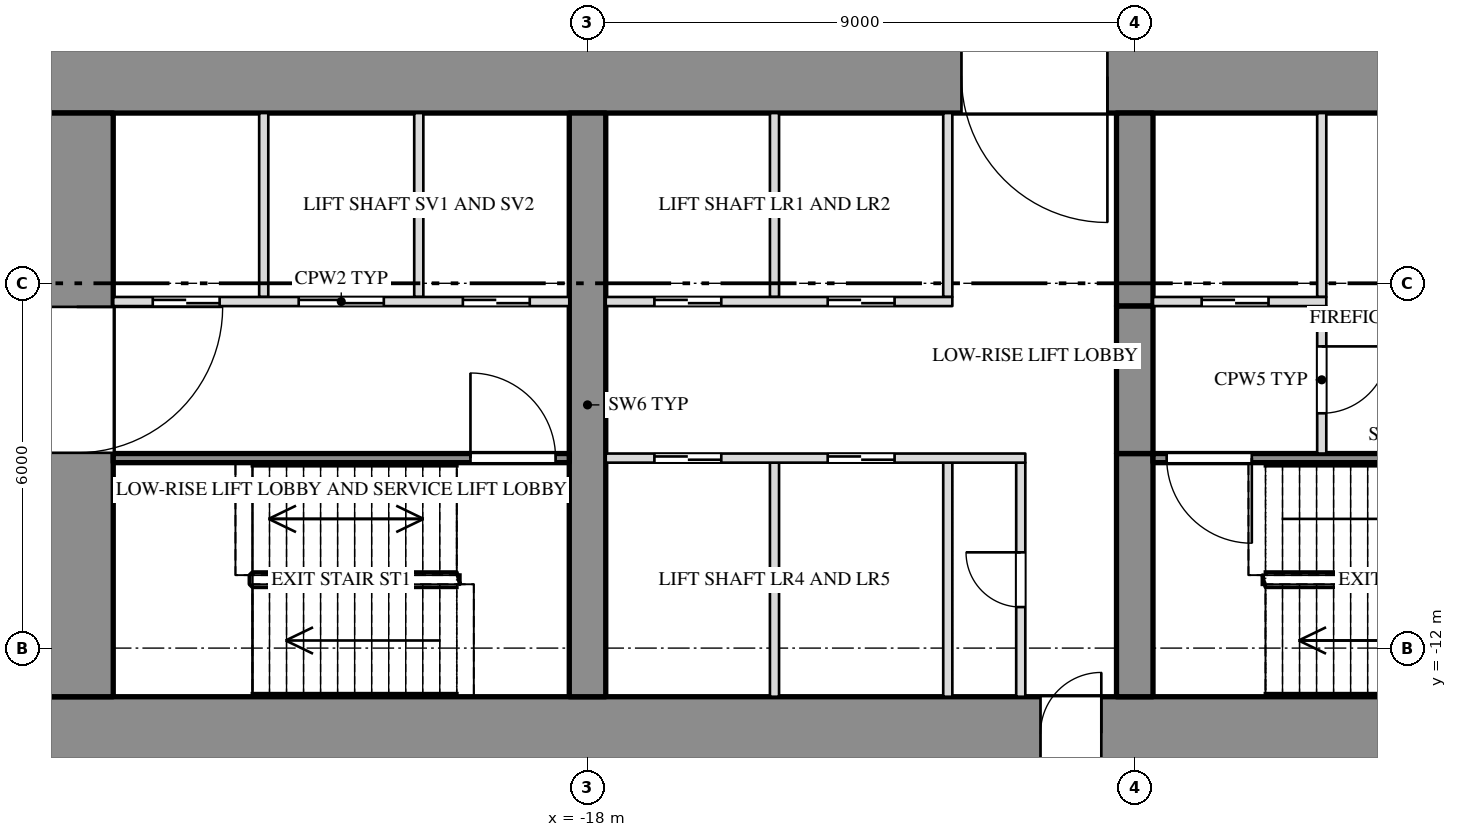
"""IFC4 building model, lengths in metres.
Left out: names, types, materials, properties, quantities, classifications, styles, units other than length and angle.
Written with IfcOpenShell. Run it as: python <this file> out.ifc"""

import sys

from ifc_helpers import new_model, si_unit, direction, frame, frame_2d, origin, place, context, subcontext, project, spatial, rectangle, extrude, element, fill, save


model = new_model("IFC4")
c1 = context("Model", 3, precision=1e-05, world=origin(), true_north=direction((0.0, 1.0)))
c2 = subcontext(c1, "Body", "Model", "MODEL_VIEW")
j1 = project(units=[si_unit("LENGTHUNIT", "METRE"), si_unit("PLANEANGLEUNIT", "RADIAN")], contexts=[c1])
p1 = place(None, origin())
s1 = spatial("IfcSite", under=j1, at=p1, CompositionType="ELEMENT")
p2 = place(p1, origin())
s2 = spatial("IfcBuilding", under=s1, at=p2, CompositionType="ELEMENT")
p3 = place(p2, frame((0.0, 0.0, 48.0)))
s3 = spatial("IfcBuildingStorey", under=s2, at=p3, CompositionType="ELEMENT", Elevation=48.0)
p4 = place(p3, frame((-27.0, -2.6, 0.0), z_axis=(0.0, 0.0, 1.0), x_axis=(1.0, 0.0, 0.0)))
e1 = element("IfcWall", 1, at=p4, inside=s3, PredefinedType="SHEAR", context=c2, shape_type="SweptSolid", body=[
    extrude(rectangle(XDim=54.0, YDim=1.2, at=frame_2d((27.0, 0.0))), origin(), (0.0, 0.0, 1.0), 4.3),
])
p5 = place(p4, frame((15.15, 0.0, 0.0)))
e2 = element("IfcOpeningElement", 2, at=p5, cuts=e1, PredefinedType="OPENING", context=c2, shape_type="SweptSolid", body=[
    extrude(rectangle(XDim=2.4, YDim=2.1, at=frame_2d((1.2, 1.05))), frame((0.0, 0.612, 0.0), z_axis=(0.0, -1.0, 0.0), x_axis=(1.0, 0.0, 0.0)), (0.0, 0.0, 1.0), 1.224),
])
p6 = place(p4, frame((36.45, 0.0, 0.0)))
e3 = element("IfcOpeningElement", 3, at=p6, cuts=e1, PredefinedType="OPENING", context=c2, shape_type="SweptSolid", body=[
    extrude(rectangle(XDim=2.4, YDim=2.1, at=frame_2d((1.2, 1.05))), frame((0.0, 0.612, 0.0), z_axis=(0.0, -1.0, 0.0), x_axis=(1.0, 0.0, 0.0)), (0.0, 0.0, 1.0), 1.224),
])
p7 = place(p3, frame((-27.0, -13.4, 0.0), z_axis=(0.0, 0.0, 1.0), x_axis=(1.0, 0.0, 0.0)))
e4 = element("IfcWall", 4, at=p7, inside=s3, PredefinedType="SHEAR", context=c2, shape_type="SweptSolid", body=[
    extrude(rectangle(XDim=54.0, YDim=1.2, at=frame_2d((27.0, 0.0))), origin(), (0.0, 0.0, 1.0), 4.3),
])
p8 = place(p7, frame((16.45, 0.0, 0.0)))
e5 = element("IfcOpeningElement", 5, at=p8, cuts=e4, PredefinedType="OPENING", context=c2, shape_type="SweptSolid", body=[
    extrude(rectangle(XDim=1.0, YDim=2.1, at=frame_2d((0.5, 1.05))), frame((0.0, 0.612, 0.0), z_axis=(0.0, -1.0, 0.0), x_axis=(1.0, 0.0, 0.0)), (0.0, 0.0, 1.0), 1.224),
])
p9 = place(p7, frame((36.55, 0.0, 0.0)))
e6 = element("IfcOpeningElement", 6, at=p9, cuts=e4, PredefinedType="OPENING", context=c2, shape_type="SweptSolid", body=[
    extrude(rectangle(XDim=1.0, YDim=2.1, at=frame_2d((0.5, 1.05))), frame((0.0, 0.612, 0.0), z_axis=(0.0, -1.0, 0.0), x_axis=(1.0, 0.0, 0.0)), (0.0, 0.0, 1.0), 1.224),
])
p10 = place(p3, frame((-26.4, -12.8, 0.0), z_axis=(0.0, 0.0, 1.0), x_axis=(0.0, 1.0, 0.0)))
e7 = element("IfcWall", 7, at=p10, inside=s3, PredefinedType="SHEAR", context=c2, shape_type="SweptSolid", body=[
    extrude(rectangle(XDim=9.6, YDim=1.2, at=frame_2d((4.8, 0.0))), origin(), (0.0, 0.0, 1.0), 4.3),
])
p11 = place(p10, frame((4.012, 0.0, 0.0)))
e8 = element("IfcOpeningElement", 8, at=p11, cuts=e7, PredefinedType="OPENING", context=c2, shape_type="SweptSolid", body=[
    extrude(rectangle(XDim=2.4, YDim=2.1, at=frame_2d((1.2, 1.05))), frame((0.0, 0.612, 0.0), z_axis=(0.0, -1.0, 0.0), x_axis=(1.0, 0.0, 0.0)), (0.0, 0.0, 1.0), 1.224),
])
p12 = place(p3, frame((-18.0, -12.8, 0.0), z_axis=(0.0, 0.0, 1.0), x_axis=(0.0, 1.0, 0.0)))
e9 = element("IfcWall", 9, at=p12, inside=s3, PredefinedType="SHEAR", context=c2, shape_type="SweptSolid", body=[
    extrude(rectangle(XDim=9.6, YDim=0.6, at=frame_2d((4.8, 0.0))), origin(), (0.0, 0.0, 1.0), 4.3),
])
p13 = place(p3, frame((-9.0, -12.8, 0.0), z_axis=(0.0, 0.0, 1.0), x_axis=(0.0, 1.0, 0.0)))
e10 = element("IfcWall", 10, at=p13, inside=s3, PredefinedType="SHEAR", context=c2, shape_type="SweptSolid", body=[
    extrude(rectangle(XDim=4.0, YDim=0.6, at=frame_2d((2.0, 0.0))), origin(), (0.0, 0.0, 1.0), 4.3),
])
p14 = place(p3, frame((-9.0, -6.375, 0.0), z_axis=(0.0, 0.0, 1.0), x_axis=(0.0, 1.0, 0.0)))
e11 = element("IfcWall", 11, at=p14, inside=s3, PredefinedType="SHEAR", context=c2, shape_type="SweptSolid", body=[
    extrude(rectangle(XDim=3.175, YDim=0.6, at=frame_2d((1.587, 0.0))), origin(), (0.0, 0.0, 1.0), 4.3),
])
p15 = place(p3, frame((-9.0, -8.8, 3.6), z_axis=(0.0, 0.0, 1.0), x_axis=(0.0, 1.0, 0.0)))
e12 = element("IfcWall", 12, at=p15, inside=s3, PredefinedType="SHEAR", context=c2, shape_type="SweptSolid", body=[
    extrude(rectangle(XDim=2.425, YDim=0.6, at=frame_2d((1.212, 0.0))), origin(), (0.0, 0.0, 1.0), 0.7),
])
for number, where, z_axis, x_axis in (
    (13, (-20.775, -6.225, 0.0), (0.0, 0.0, 1.0), (0.0, 1.0, 0.0)),
    (14, (-23.325, -6.225, 0.0), (0.0, 0.0, 1.0), (0.0, 1.0, 0.0)),
    (15, (-12.075, -6.225, 0.0), (0.0, 0.0, 1.0), (0.0, 1.0, 0.0)),
    (16, (-14.925, -6.225, 0.0), (0.0, 0.0, 1.0), (0.0, 1.0, 0.0)),
    (17, (-5.925, -6.225, 0.0), (0.0, 0.0, 1.0), (0.0, 1.0, 0.0)),
):
    element("IfcWall", number, at=place(p3, frame(where, z_axis=z_axis, x_axis=x_axis)), inside=s3, PredefinedType="PARTITIONING", context=c2, shape_type="SweptSolid", body=[
        extrude(rectangle(XDim=3.025, YDim=0.15, at=frame_2d((1.513, 0.0))), origin(), (0.0, 0.0, 1.0), 4.3),
    ])
p16 = place(p3, frame((-10.875, -12.8, 0.0), z_axis=(0.0, 0.0, 1.0), x_axis=(0.0, 1.0, 0.0)))
e18 = element("IfcWall", 18, at=p16, inside=s3, PredefinedType="PARTITIONING", context=c2, shape_type="SweptSolid", body=[
    extrude(rectangle(XDim=3.85, YDim=0.15, at=frame_2d((1.925, 0.0))), origin(), (0.0, 0.0, 1.0), 4.3),
])
p17 = place(p16, frame((1.475, 0.0, 0.0)))
e19 = element("IfcOpeningElement", 19, at=p17, cuts=e18, PredefinedType="OPENING", context=c2, shape_type="SweptSolid", body=[
    extrude(rectangle(XDim=0.9, YDim=2.1, at=frame_2d((0.45, 1.05))), frame((0.0, 0.087, 0.0), z_axis=(0.0, -1.0, 0.0), x_axis=(1.0, 0.0, 0.0)), (0.0, 0.0, 1.0), 0.174),
])
for number, where, z_axis, x_axis in (
    (20, (-12.075, -12.8, 0.0), (0.0, 0.0, 1.0), (0.0, 1.0, 0.0)),
    (21, (-14.925, -12.8, 0.0), (0.0, 0.0, 1.0), (0.0, 1.0, 0.0)),
):
    element("IfcWall", number, at=place(p3, frame(where, z_axis=z_axis, x_axis=x_axis)), inside=s3, PredefinedType="PARTITIONING", context=c2, shape_type="SweptSolid", body=[
        extrude(rectangle(XDim=3.85, YDim=0.15, at=frame_2d((1.925, 0.0))), origin(), (0.0, 0.0, 1.0), 4.3),
    ])
p18 = place(p3, frame((-5.925, -8.8, 0.0), z_axis=(0.0, 0.0, 1.0), x_axis=(0.0, 1.0, 0.0)))
e22 = element("IfcWall", 22, at=p18, inside=s3, PredefinedType="PARTITIONING", context=c2, shape_type="SweptSolid", body=[
    extrude(rectangle(XDim=2.425, YDim=0.15, at=frame_2d((1.212, 0.0))), origin(), (0.0, 0.0, 1.0), 4.3),
])
p19 = place(p18, frame((0.662, 0.0, 0.0)))
e23 = element("IfcOpeningElement", 23, at=p19, cuts=e22, PredefinedType="OPENING", context=c2, shape_type="SweptSolid", body=[
    extrude(rectangle(XDim=1.1, YDim=2.1, at=frame_2d((0.55, 1.05))), frame((0.0, 0.087, 0.0), z_axis=(0.0, -1.0, 0.0), x_axis=(1.0, 0.0, 0.0)), (0.0, 0.0, 1.0), 0.174),
])
p20 = place(p3, frame((-25.8, -6.3, 0.0), z_axis=(0.0, 0.0, 1.0), x_axis=(1.0, 0.0, 0.0)))
e24 = element("IfcWall", 24, at=p20, inside=s3, PredefinedType="PARTITIONING", context=c2, shape_type="SweptSolid", body=[
    extrude(rectangle(XDim=7.5, YDim=0.15, at=frame_2d((3.75, 0.0))), origin(), (0.0, 0.0, 1.0), 4.3),
])
p21 = place(p20, frame((0.65, 0.0, 0.0)))
e25 = element("IfcOpeningElement", 25, at=p21, cuts=e24, PredefinedType="OPENING", context=c2, shape_type="SweptSolid", body=[
    extrude(rectangle(XDim=1.1, YDim=2.1, at=frame_2d((0.55, 1.05))), frame((0.0, 0.087, 0.0), z_axis=(0.0, -1.0, 0.0), x_axis=(1.0, 0.0, 0.0)), (0.0, 0.0, 1.0), 0.174),
])
p22 = place(p20, frame((3.05, 0.0, 0.0)))
e26 = element("IfcOpeningElement", 26, at=p22, cuts=e24, PredefinedType="OPENING", context=c2, shape_type="SweptSolid", body=[
    extrude(rectangle(XDim=1.4, YDim=2.1, at=frame_2d((0.7, 1.05))), frame((0.0, 0.087, 0.0), z_axis=(0.0, -1.0, 0.0), x_axis=(1.0, 0.0, 0.0)), (0.0, 0.0, 1.0), 0.174),
])
p23 = place(p20, frame((5.75, 0.0, 0.0)))
e27 = element("IfcOpeningElement", 27, at=p23, cuts=e24, PredefinedType="OPENING", context=c2, shape_type="SweptSolid", body=[
    extrude(rectangle(XDim=1.1, YDim=2.1, at=frame_2d((0.55, 1.05))), frame((0.0, 0.087, 0.0), z_axis=(0.0, -1.0, 0.0), x_axis=(1.0, 0.0, 0.0)), (0.0, 0.0, 1.0), 0.174),
])
p24 = place(p3, frame((-17.7, -6.3, 0.0), z_axis=(0.0, 0.0, 1.0), x_axis=(1.0, 0.0, 0.0)))
e28 = element("IfcWall", 28, at=p24, inside=s3, PredefinedType="PARTITIONING", context=c2, shape_type="SweptSolid", body=[
    extrude(rectangle(XDim=5.7, YDim=0.15, at=frame_2d((2.85, 0.0))), origin(), (0.0, 0.0, 1.0), 4.3),
])
p25 = place(p24, frame((0.8, 0.0, 0.0)))
e29 = element("IfcOpeningElement", 29, at=p25, cuts=e28, PredefinedType="OPENING", context=c2, shape_type="SweptSolid", body=[
    extrude(rectangle(XDim=1.1, YDim=2.1, at=frame_2d((0.55, 1.05))), frame((0.0, 0.087, 0.0), z_axis=(0.0, -1.0, 0.0), x_axis=(1.0, 0.0, 0.0)), (0.0, 0.0, 1.0), 0.174),
])
p26 = place(p24, frame((3.65, 0.0, 0.0)))
e30 = element("IfcOpeningElement", 30, at=p26, cuts=e28, PredefinedType="OPENING", context=c2, shape_type="SweptSolid", body=[
    extrude(rectangle(XDim=1.1, YDim=2.1, at=frame_2d((0.55, 1.05))), frame((0.0, 0.087, 0.0), z_axis=(0.0, -1.0, 0.0), x_axis=(1.0, 0.0, 0.0)), (0.0, 0.0, 1.0), 0.174),
])
p27 = place(p3, frame((-8.7, -6.3, 0.0), z_axis=(0.0, 0.0, 1.0), x_axis=(1.0, 0.0, 0.0)))
e31 = element("IfcWall", 31, at=p27, inside=s3, PredefinedType="PARTITIONING", context=c2, shape_type="SweptSolid", body=[
    extrude(rectangle(XDim=2.85, YDim=0.15, at=frame_2d((1.425, 0.0))), origin(), (0.0, 0.0, 1.0), 4.3),
])
p28 = place(p27, frame((0.8, 0.0, 0.0)))
e32 = element("IfcOpeningElement", 32, at=p28, cuts=e31, PredefinedType="OPENING", context=c2, shape_type="SweptSolid", body=[
    extrude(rectangle(XDim=1.1, YDim=2.1, at=frame_2d((0.55, 1.05))), frame((0.0, 0.087, 0.0), z_axis=(0.0, -1.0, 0.0), x_axis=(1.0, 0.0, 0.0)), (0.0, 0.0, 1.0), 0.174),
])
p29 = place(p3, frame((-25.8, -8.875, 0.0), z_axis=(0.0, 0.0, 1.0), x_axis=(1.0, 0.0, 0.0)))
e33 = element("IfcWall", 33, at=p29, inside=s3, PredefinedType="SHEAR", context=c2, shape_type="SweptSolid", body=[
    extrude(rectangle(XDim=7.5, YDim=0.15, at=frame_2d((3.75, 0.0))), origin(), (0.0, 0.0, 1.0), 4.3),
])
p30 = place(p29, frame((5.875, 0.0, 0.0)))
e34 = element("IfcOpeningElement", 34, at=p30, cuts=e33, PredefinedType="OPENING", context=c2, shape_type="SweptSolid", body=[
    extrude(rectangle(XDim=1.4, YDim=2.1, at=frame_2d((0.7, 1.05))), frame((0.0, 0.087, 0.0), z_axis=(0.0, -1.0, 0.0), x_axis=(1.0, 0.0, 0.0)), (0.0, 0.0, 1.0), 0.174),
])
p31 = place(p3, frame((-17.7, -8.875, 0.0), z_axis=(0.0, 0.0, 1.0), x_axis=(1.0, 0.0, 0.0)))
e35 = element("IfcWall", 35, at=p31, inside=s3, PredefinedType="PARTITIONING", context=c2, shape_type="SweptSolid", body=[
    extrude(rectangle(XDim=6.9, YDim=0.15, at=frame_2d((3.45, 0.0))), origin(), (0.0, 0.0, 1.0), 4.3),
])
p32 = place(p31, frame((0.8, 0.0, 0.0)))
e36 = element("IfcOpeningElement", 36, at=p32, cuts=e35, PredefinedType="OPENING", context=c2, shape_type="SweptSolid", body=[
    extrude(rectangle(XDim=1.1, YDim=2.1, at=frame_2d((0.55, 1.05))), frame((0.0, 0.087, 0.0), z_axis=(0.0, -1.0, 0.0), x_axis=(1.0, 0.0, 0.0)), (0.0, 0.0, 1.0), 0.174),
])
p33 = place(p31, frame((3.65, 0.0, 0.0)))
e37 = element("IfcOpeningElement", 37, at=p33, cuts=e35, PredefinedType="OPENING", context=c2, shape_type="SweptSolid", body=[
    extrude(rectangle(XDim=1.1, YDim=2.1, at=frame_2d((0.55, 1.05))), frame((0.0, 0.087, 0.0), z_axis=(0.0, -1.0, 0.0), x_axis=(1.0, 0.0, 0.0)), (0.0, 0.0, 1.0), 0.174),
])
p34 = place(p3, frame((-8.7, -8.875, 0.0), z_axis=(0.0, 0.0, 1.0), x_axis=(1.0, 0.0, 0.0)))
e38 = element("IfcWall", 38, at=p34, inside=s3, PredefinedType="SHEAR", context=c2, shape_type="SweptSolid", body=[
    extrude(rectangle(XDim=8.4, YDim=0.15, at=frame_2d((4.2, 0.0))), origin(), (0.0, 0.0, 1.0), 4.3),
])
p35 = place(p34, frame((0.225, 0.0, 0.0)))
e39 = element("IfcOpeningElement", 39, at=p35, cuts=e38, PredefinedType="OPENING", context=c2, shape_type="SweptSolid", body=[
    extrude(rectangle(XDim=1.4, YDim=2.1, at=frame_2d((0.7, 1.05))), frame((0.0, 0.087, 0.0), z_axis=(0.0, -1.0, 0.0), x_axis=(1.0, 0.0, 0.0)), (0.0, 0.0, 1.0), 0.174),
])
p36 = place(p11, origin())
e40 = element("IfcDoor", 40, at=p36, inside=s3, OperationType="DOUBLE_DOOR_SINGLE_SWING", PredefinedType="DOOR", context=c2, shape_type="SweptSolid", body=[
    extrude(rectangle(XDim=2.4, YDim=2.1, at=frame_2d((1.2, 1.05))), frame((0.0, 0.025, 0.0), z_axis=(0.0, -1.0, 0.0), x_axis=(1.0, 0.0, 0.0)), (0.0, 0.0, 1.0), 0.05),
])
fill(e8, e40)
p37 = place(p21, origin())
e41 = element("IfcDoor", 41, at=p37, inside=s3, OperationType="SLIDING_TO_RIGHT", PredefinedType="DOOR", context=c2, shape_type="SweptSolid", body=[
    extrude(rectangle(XDim=1.1, YDim=2.1, at=frame_2d((0.55, 1.05))), frame((0.0, 0.025, 0.0), z_axis=(0.0, -1.0, 0.0), x_axis=(1.0, 0.0, 0.0)), (0.0, 0.0, 1.0), 0.05),
])
fill(e25, e41)
p38 = place(p22, origin())
e42 = element("IfcDoor", 42, at=p38, inside=s3, OperationType="SLIDING_TO_LEFT", PredefinedType="DOOR", context=c2, shape_type="SweptSolid", body=[
    extrude(rectangle(XDim=1.4, YDim=2.1, at=frame_2d((0.7, 1.05))), frame((0.0, 0.025, 0.0), z_axis=(0.0, -1.0, 0.0), x_axis=(1.0, 0.0, 0.0)), (0.0, 0.0, 1.0), 0.05),
])
fill(e26, e42)
p39 = place(p23, origin())
e43 = element("IfcDoor", 43, at=p39, inside=s3, OperationType="SLIDING_TO_RIGHT", PredefinedType="DOOR", context=c2, shape_type="SweptSolid", body=[
    extrude(rectangle(XDim=1.1, YDim=2.1, at=frame_2d((0.55, 1.05))), frame((0.0, 0.025, 0.0), z_axis=(0.0, -1.0, 0.0), x_axis=(1.0, 0.0, 0.0)), (0.0, 0.0, 1.0), 0.05),
])
fill(e27, e43)
p40 = place(p30, origin())
e44 = element("IfcDoor", 44, at=p40, inside=s3, OperationType="DOUBLE_DOOR_SINGLE_SWING", PredefinedType="DOOR", context=c2, shape_type="SweptSolid", body=[
    extrude(rectangle(XDim=1.4, YDim=2.1, at=frame_2d((0.7, 1.05))), frame((0.0, 0.025, 0.0), z_axis=(0.0, -1.0, 0.0), x_axis=(1.0, 0.0, 0.0)), (0.0, 0.0, 1.0), 0.05),
])
fill(e34, e44)
p41 = place(p32, origin())
e45 = element("IfcDoor", 45, at=p41, inside=s3, OperationType="SLIDING_TO_RIGHT", PredefinedType="DOOR", context=c2, shape_type="SweptSolid", body=[
    extrude(rectangle(XDim=1.1, YDim=2.1, at=frame_2d((0.55, 1.05))), frame((0.0, 0.025, 0.0), z_axis=(0.0, -1.0, 0.0), x_axis=(1.0, 0.0, 0.0)), (0.0, 0.0, 1.0), 0.05),
])
fill(e36, e45)
p42 = place(p25, origin())
e46 = element("IfcDoor", 46, at=p42, inside=s3, OperationType="SLIDING_TO_LEFT", PredefinedType="DOOR", context=c2, shape_type="SweptSolid", body=[
    extrude(rectangle(XDim=1.1, YDim=2.1, at=frame_2d((0.55, 1.05))), frame((0.0, 0.025, 0.0), z_axis=(0.0, -1.0, 0.0), x_axis=(1.0, 0.0, 0.0)), (0.0, 0.0, 1.0), 0.05),
])
fill(e29, e46)
p43 = place(p33, origin())
e47 = element("IfcDoor", 47, at=p43, inside=s3, OperationType="SLIDING_TO_RIGHT", PredefinedType="DOOR", context=c2, shape_type="SweptSolid", body=[
    extrude(rectangle(XDim=1.1, YDim=2.1, at=frame_2d((0.55, 1.05))), frame((0.0, 0.025, 0.0), z_axis=(0.0, -1.0, 0.0), x_axis=(1.0, 0.0, 0.0)), (0.0, 0.0, 1.0), 0.05),
])
fill(e37, e47)
p44 = place(p26, origin())
e48 = element("IfcDoor", 48, at=p44, inside=s3, OperationType="SLIDING_TO_LEFT", PredefinedType="DOOR", context=c2, shape_type="SweptSolid", body=[
    extrude(rectangle(XDim=1.1, YDim=2.1, at=frame_2d((0.55, 1.05))), frame((0.0, 0.025, 0.0), z_axis=(0.0, -1.0, 0.0), x_axis=(1.0, 0.0, 0.0)), (0.0, 0.0, 1.0), 0.05),
])
fill(e30, e48)
p45 = place(p17, origin())
e49 = element("IfcDoor", 49, at=p45, inside=s3, OperationType="SINGLE_SWING_RIGHT", PredefinedType="DOOR", context=c2, shape_type="SweptSolid", body=[
    extrude(rectangle(XDim=0.9, YDim=2.1, at=frame_2d((0.45, 1.05))), frame((0.0, 0.025, 0.0), z_axis=(0.0, -1.0, 0.0), x_axis=(1.0, 0.0, 0.0)), (0.0, 0.0, 1.0), 0.05),
])
fill(e19, e49)
p46 = place(p5, origin())
e50 = element("IfcDoor", 50, at=p46, inside=s3, OperationType="DOUBLE_DOOR_SINGLE_SWING", PredefinedType="DOOR", context=c2, shape_type="SweptSolid", body=[
    extrude(rectangle(XDim=2.4, YDim=2.1, at=frame_2d((1.2, 1.05))), frame((0.0, 0.025, 0.0), z_axis=(0.0, -1.0, 0.0), x_axis=(1.0, 0.0, 0.0)), (0.0, 0.0, 1.0), 0.05),
])
fill(e2, e50)
p47 = place(p8, origin())
e51 = element("IfcDoor", 51, at=p47, inside=s3, OperationType="SINGLE_SWING_RIGHT", PredefinedType="DOOR", context=c2, shape_type="SweptSolid", body=[
    extrude(rectangle(XDim=1.0, YDim=2.1, at=frame_2d((0.5, 1.05))), frame((0.0, 0.025, 0.0), z_axis=(0.0, -1.0, 0.0), x_axis=(1.0, 0.0, 0.0)), (0.0, 0.0, 1.0), 0.05),
])
fill(e5, e51)
p48 = place(p35, origin())
e52 = element("IfcDoor", 52, at=p48, inside=s3, OperationType="DOUBLE_DOOR_SINGLE_SWING", PredefinedType="DOOR", context=c2, shape_type="SweptSolid", body=[
    extrude(rectangle(XDim=1.4, YDim=2.1, at=frame_2d((0.7, 1.05))), frame((0.0, 0.025, 0.0), z_axis=(0.0, -1.0, 0.0), x_axis=(1.0, 0.0, 0.0)), (0.0, 0.0, 1.0), 0.05),
])
fill(e39, e52)
p49 = place(p28, origin())
e53 = element("IfcDoor", 53, at=p49, inside=s3, OperationType="SLIDING_TO_RIGHT", PredefinedType="DOOR", context=c2, shape_type="SweptSolid", body=[
    extrude(rectangle(XDim=1.1, YDim=2.1, at=frame_2d((0.55, 1.05))), frame((0.0, 0.025, 0.0), z_axis=(0.0, -1.0, 0.0), x_axis=(1.0, 0.0, 0.0)), (0.0, 0.0, 1.0), 0.05),
])
fill(e32, e53)
p50 = place(p19, origin())
e54 = element("IfcDoor", 54, at=p50, inside=s3, OperationType="SINGLE_SWING_LEFT", PredefinedType="DOOR", context=c2, shape_type="SweptSolid", body=[
    extrude(rectangle(XDim=1.1, YDim=2.1, at=frame_2d((0.55, 1.05))), frame((0.0, 0.025, 0.0), z_axis=(0.0, -1.0, 0.0), x_axis=(1.0, 0.0, 0.0)), (0.0, 0.0, 1.0), 0.05),
])
fill(e23, e54)
save(model, sys.argv[1])
